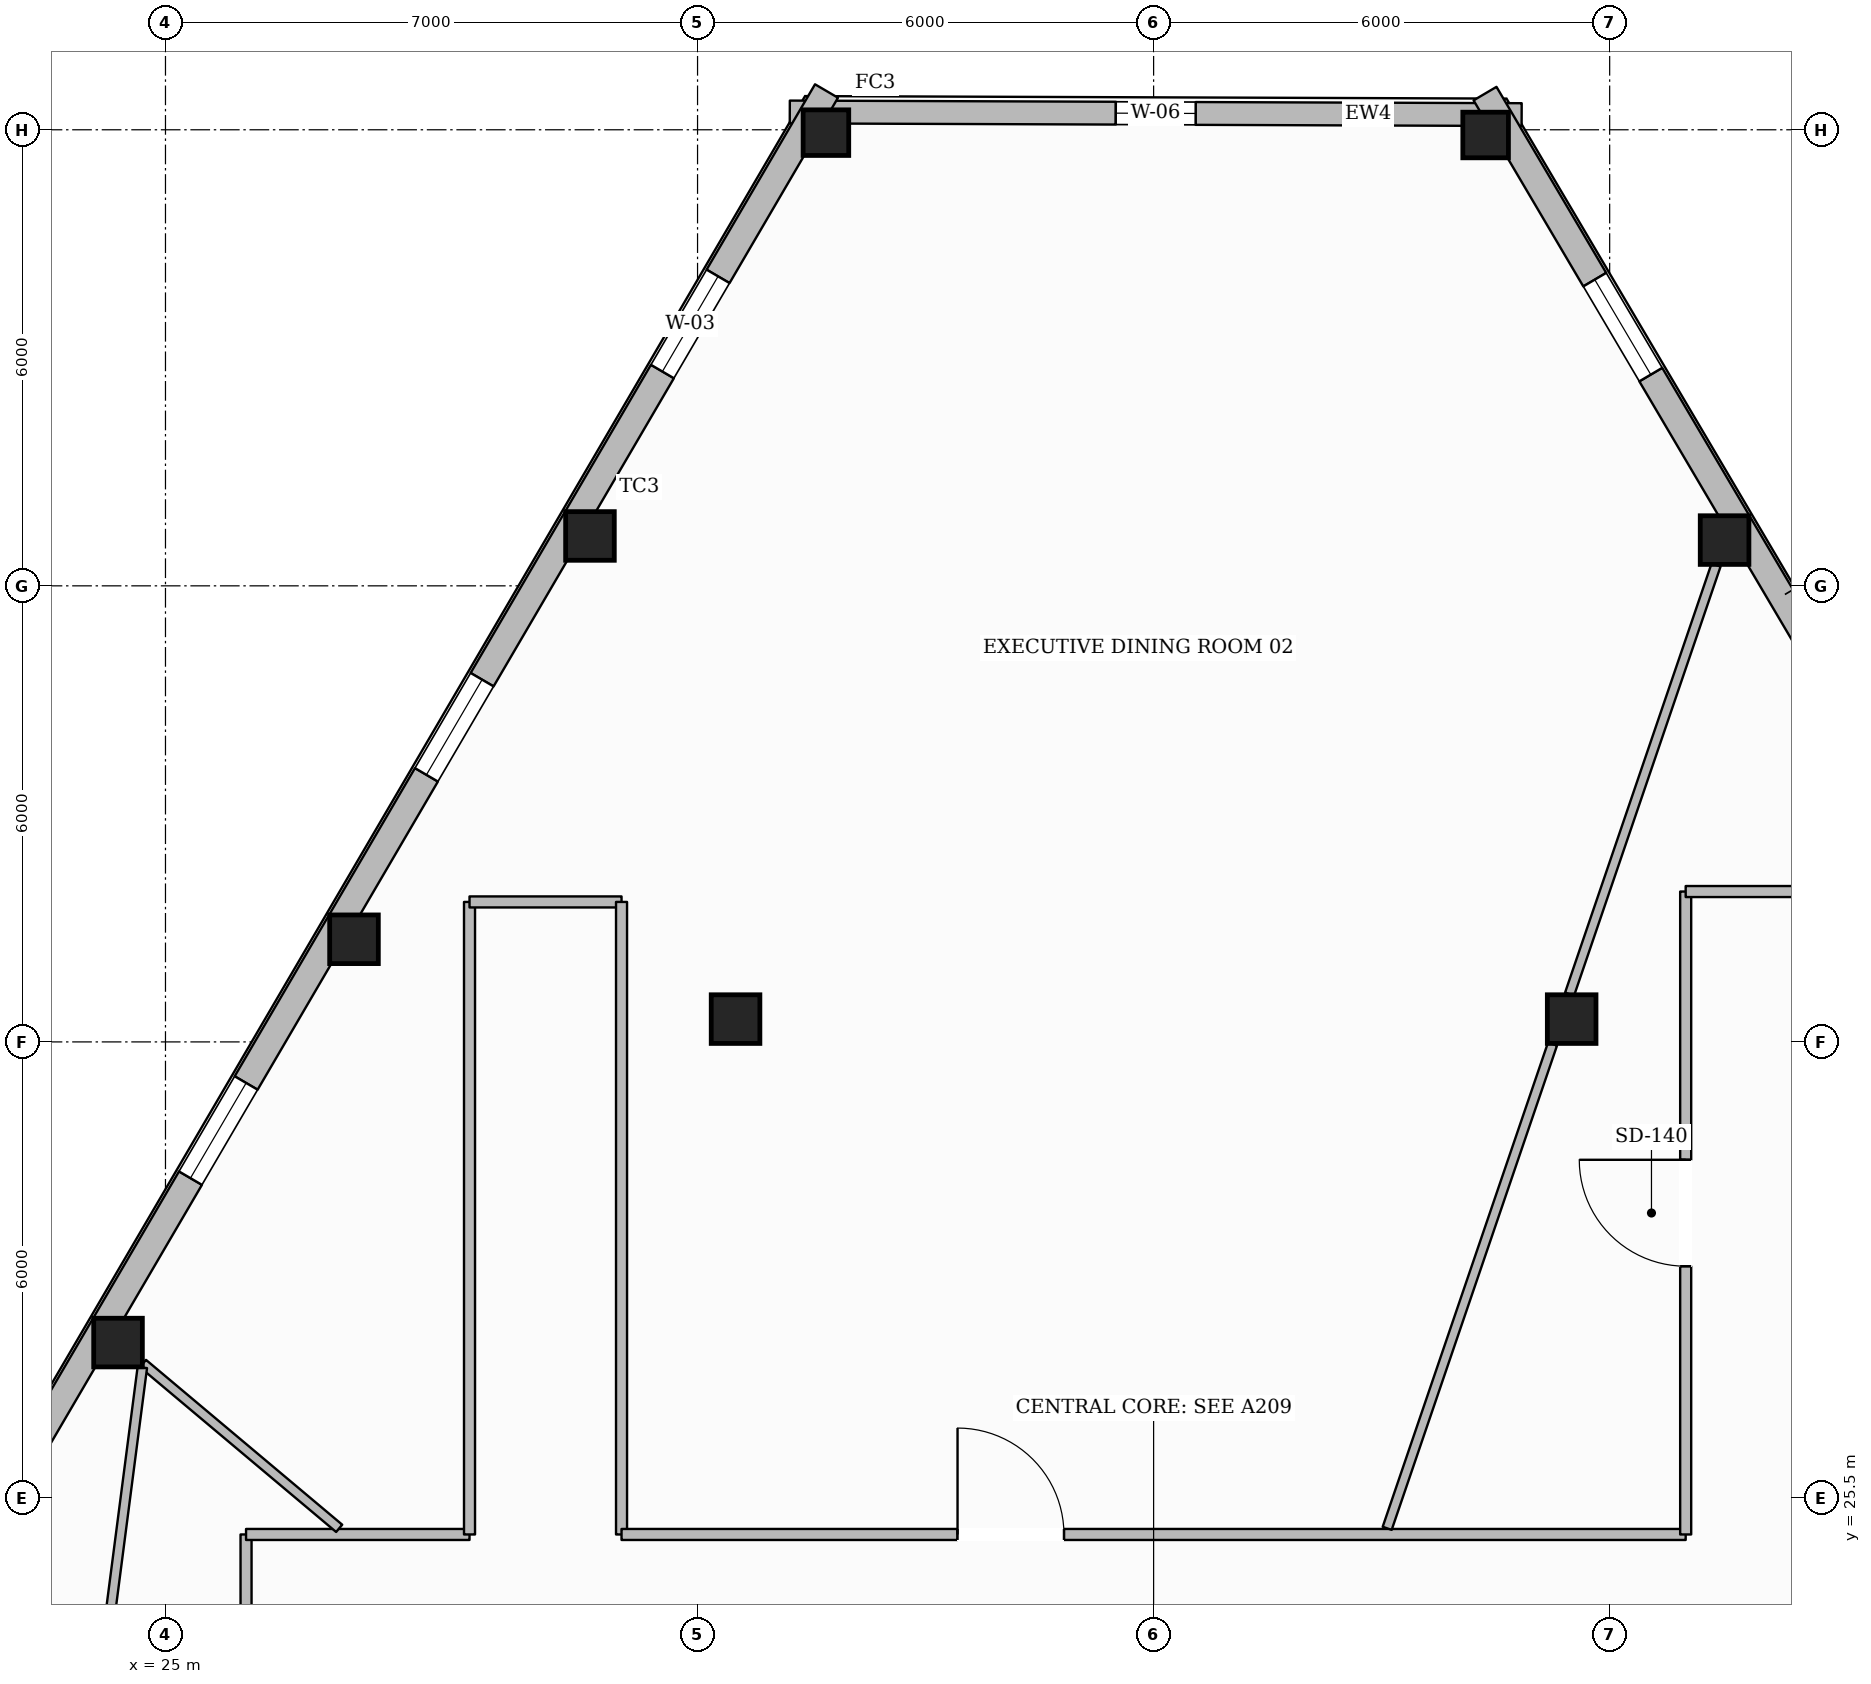
"""IFC4 building model, lengths in metres.
Left out: names, types, materials, properties, quantities, classifications, styles, units other than length and angle.
Written with IfcOpenShell. Run it as: python <this file> out.ifc"""

import sys

from ifc_helpers import new_model, si_unit, direction, frame, frame_2d, origin, origin_2d, place, context, subcontext, project, spatial, rectangle, hollow_rectangle, extrude, element, fill, save


model = new_model("IFC4")
c1 = context("Model", 3, precision=1e-05, world=origin(), true_north=direction((0.0, 1.0)))
c2 = subcontext(c1, "Body", "Model", "MODEL_VIEW")
j1 = project(units=[si_unit("LENGTHUNIT", "METRE"), si_unit("PLANEANGLEUNIT", "RADIAN")], contexts=[c1])
p1 = place(None, origin())
s1 = spatial("IfcSite", under=j1, at=p1, CompositionType="ELEMENT")
p2 = place(p1, origin())
s2 = spatial("IfcBuilding", under=s1, at=p2, CompositionType="ELEMENT")
p3 = place(p2, frame((0.0, 0.0, 199.65)))
s3 = spatial("IfcBuildingStorey", under=s2, at=p3, CompositionType="ELEMENT", Elevation=199.65)
p4 = place(p3, frame((33.689, 43.462, 0.0), z_axis=(0.0, 0.0, 1.0), x_axis=(1.0, 0.0, 0.0)))
e1 = element("IfcColumn", 1, at=p4, inside=s3, PredefinedType="COLUMN", context=c2, shape_type="SweptSolid", body=[
    extrude(hollow_rectangle(XDim=0.6, YDim=0.6, WallThickness=0.028, at=origin_2d()), origin(), (0.0, 0.0, 1.0), 3.6),
])
for number, where, z_axis, x_axis in (
    (2, (30.585, 38.156, 0.0), (0.0, 0.0, 1.0), (1.0, 0.0, 0.0)),
    (3, (27.48, 32.85, 0.0), (0.0, 0.0, 1.0), (1.0, 0.0, 0.0)),
    (4, (24.376, 27.544, 0.0), (0.0, 0.0, 1.0), (1.0, 0.0, 0.0)),
    (5, (45.512, 38.102, 0.0), (0.0, 0.0, 1.0), (1.0, 0.0, 0.0)),
):
    element("IfcColumn", number, at=place(p3, frame(where, z_axis=z_axis, x_axis=x_axis)), inside=s3, PredefinedType="COLUMN", context=c2, shape_type="SweptSolid", body=[
        extrude(hollow_rectangle(XDim=0.64, YDim=0.64, WallThickness=0.028, at=origin_2d()), origin(), (0.0, 0.0, 1.0), 3.6),
    ])
p5 = place(p3, frame((42.368, 43.431, 0.0), z_axis=(0.0, 0.0, 1.0), x_axis=(1.0, 0.0, 0.0)))
e6 = element("IfcColumn", 6, at=p5, inside=s3, PredefinedType="COLUMN", context=c2, shape_type="SweptSolid", body=[
    extrude(hollow_rectangle(XDim=0.6, YDim=0.6, WallThickness=0.028, at=origin_2d()), origin(), (0.0, 0.0, 1.0), 3.6),
])
for number, where, z_axis, x_axis in (
    (7, (32.5, 31.8, 0.0), (0.0, 0.0, 1.0), (1.0, 0.0, 0.0)),
    (8, (43.5, 31.8, 0.0), (0.0, 0.0, 1.0), (1.0, 0.0, 0.0)),
):
    element("IfcColumn", number, at=place(p3, frame(where, z_axis=z_axis, x_axis=x_axis)), inside=s3, PredefinedType="COLUMN", context=c2, shape_type="SweptSolid", body=[
        extrude(hollow_rectangle(XDim=0.64, YDim=0.64, WallThickness=0.028, at=origin_2d()), origin(), (0.0, 0.0, 1.0), 3.6),
    ])
p6 = place(p3, frame((33.214, 43.734, 0.0), z_axis=(0.0, 0.0, 1.0), x_axis=(0.999993608919, -0.00357520916, 0.0)))
e9 = element("IfcWall", 9, at=p6, inside=s3, PredefinedType="STANDARD", context=c2, shape_type="SweptSolid", body=[
    extrude(rectangle(XDim=9.628, YDim=0.3, at=frame_2d((4.814, 0.0))), origin(), (0.0, 0.0, 1.0), 3.132),
])
p7 = place(p6, frame((4.289, 0.0, 0.65)))
e10 = element("IfcOpeningElement", 10, at=p7, cuts=e9, PredefinedType="OPENING", context=c2, shape_type="SweptSolid", body=[
    extrude(rectangle(XDim=1.05, YDim=1.7, at=frame_2d((0.525, 0.85))), frame((0.0, 0.16, 0.0), z_axis=(0.0, -1.0, 0.0), x_axis=(1.0, 0.0, 0.0)), (0.0, 0.0, 1.0), 0.32),
])
p8 = place(p3, frame((14.586, 11.347, 0.0), z_axis=(0.0, 0.0, 1.0), x_axis=(0.504997770855, 0.863120647089, 0.0)))
e11 = element("IfcWall", 11, at=p8, inside=s3, PredefinedType="STANDARD", context=c2, shape_type="SweptSolid", body=[
    extrude(rectangle(XDim=37.843, YDim=0.35, at=frame_2d((18.921, 0.0))), origin(), (0.0, 0.0, 1.0), 3.132),
])
p9 = place(p8, frame((9.061, 0.0, 0.0)))
e12 = element("IfcOpeningElement", 12, at=p9, cuts=e11, PredefinedType="OPENING", context=c2, shape_type="SweptSolid", body=[
    extrude(rectangle(XDim=1.0, YDim=2.2, at=frame_2d((0.5, 1.1))), frame((0.0, 0.185, 0.0), z_axis=(0.0, -1.0, 0.0), x_axis=(1.0, 0.0, 0.0)), (0.0, 0.0, 1.0), 0.37),
])
p10 = place(p8, frame((33.567, 0.0, 0.65)))
e13 = element("IfcOpeningElement", 13, at=p10, cuts=e11, PredefinedType="OPENING", context=c2, shape_type="SweptSolid", body=[
    extrude(rectangle(XDim=1.45, YDim=1.75, at=frame_2d((0.725, 0.875))), frame((0.0, 0.185, 0.0), z_axis=(0.0, -1.0, 0.0), x_axis=(1.0, 0.0, 0.0)), (0.0, 0.0, 1.0), 0.37),
])
p11 = place(p8, frame((27.42, 0.0, 0.65)))
e14 = element("IfcOpeningElement", 14, at=p11, cuts=e11, PredefinedType="OPENING", context=c2, shape_type="SweptSolid", body=[
    extrude(rectangle(XDim=1.45, YDim=1.75, at=frame_2d((0.725, 0.875))), frame((0.0, 0.185, 0.0), z_axis=(0.0, -1.0, 0.0), x_axis=(1.0, 0.0, 0.0)), (0.0, 0.0, 1.0), 0.37),
])
p12 = place(p8, frame((21.273, 0.0, 0.65)))
e15 = element("IfcOpeningElement", 15, at=p12, cuts=e11, PredefinedType="OPENING", context=c2, shape_type="SweptSolid", body=[
    extrude(rectangle(XDim=1.45, YDim=1.75, at=frame_2d((0.725, 0.875))), frame((0.0, 0.185, 0.0), z_axis=(0.0, -1.0, 0.0), x_axis=(1.0, 0.0, 0.0)), (0.0, 0.0, 1.0), 0.37),
])
p13 = place(p8, frame((2.831, 0.0, 0.65)))
e16 = element("IfcOpeningElement", 16, at=p13, cuts=e11, PredefinedType="OPENING", context=c2, shape_type="SweptSolid", body=[
    extrude(rectangle(XDim=1.45, YDim=1.75, at=frame_2d((0.725, 0.875))), frame((0.0, 0.185, 0.0), z_axis=(0.0, -1.0, 0.0), x_axis=(1.0, 0.0, 0.0)), (0.0, 0.0, 1.0), 0.37),
])
p14 = place(p3, frame((42.36, 43.976, 0.0), z_axis=(0.0, 0.0, 1.0), x_axis=(0.508076618563, -0.861311877121, 0.0)))
e17 = element("IfcWall", 17, at=p14, inside=s3, PredefinedType="STANDARD", context=c2, shape_type="SweptSolid", body=[
    extrude(rectangle(XDim=38.079, YDim=0.35, at=frame_2d((19.04, 0.0))), origin(), (0.0, 0.0, 1.0), 3.132),
])
p15 = place(p14, frame((9.12, 0.0, 0.0)))
e18 = element("IfcOpeningElement", 18, at=p15, cuts=e17, PredefinedType="OPENING", context=c2, shape_type="SweptSolid", body=[
    extrude(rectangle(XDim=1.0, YDim=2.2, at=frame_2d((0.5, 1.1))), frame((0.0, 0.185, 0.0), z_axis=(0.0, -1.0, 0.0), x_axis=(1.0, 0.0, 0.0)), (0.0, 0.0, 1.0), 0.37),
])
p16 = place(p14, frame((33.779, 0.0, 0.65)))
e19 = element("IfcOpeningElement", 19, at=p16, cuts=e17, PredefinedType="OPENING", context=c2, shape_type="SweptSolid", body=[
    extrude(rectangle(XDim=1.45, YDim=1.75, at=frame_2d((0.725, 0.875))), frame((0.0, 0.185, 0.0), z_axis=(0.0, -1.0, 0.0), x_axis=(1.0, 0.0, 0.0)), (0.0, 0.0, 1.0), 0.37),
])
p17 = place(p14, frame((27.591, 0.0, 0.65)))
e20 = element("IfcOpeningElement", 20, at=p17, cuts=e17, PredefinedType="OPENING", context=c2, shape_type="SweptSolid", body=[
    extrude(rectangle(XDim=1.45, YDim=1.75, at=frame_2d((0.725, 0.875))), frame((0.0, 0.185, 0.0), z_axis=(0.0, -1.0, 0.0), x_axis=(1.0, 0.0, 0.0)), (0.0, 0.0, 1.0), 0.37),
])
p18 = place(p14, frame((21.404, 0.0, 0.65)))
e21 = element("IfcOpeningElement", 21, at=p18, cuts=e17, PredefinedType="OPENING", context=c2, shape_type="SweptSolid", body=[
    extrude(rectangle(XDim=1.45, YDim=1.75, at=frame_2d((0.725, 0.875))), frame((0.0, 0.185, 0.0), z_axis=(0.0, -1.0, 0.0), x_axis=(1.0, 0.0, 0.0)), (0.0, 0.0, 1.0), 0.37),
])
p19 = place(p14, frame((2.842, 0.0, 0.65)))
e22 = element("IfcOpeningElement", 22, at=p19, cuts=e17, PredefinedType="OPENING", context=c2, shape_type="SweptSolid", body=[
    extrude(rectangle(XDim=1.45, YDim=1.75, at=frame_2d((0.725, 0.875))), frame((0.0, 0.185, 0.0), z_axis=(0.0, -1.0, 0.0), x_axis=(1.0, 0.0, 0.0)), (0.0, 0.0, 1.0), 0.37),
])
p20 = place(p3, frame((26.06, 17.65, 0.0), z_axis=(0.0, 0.0, 1.0), x_axis=(0.0, 1.0, 0.0)))
e23 = element("IfcWall", 23, at=p20, inside=s3, PredefinedType="PARTITIONING", context=c2, shape_type="SweptSolid", body=[
    extrude(rectangle(XDim=7.37, YDim=0.145, at=frame_2d((3.685, 0.0))), origin(), (0.0, 0.0, 1.0), 3.339),
])
p21 = place(p20, frame((3.195, 0.0, 0.0)))
e24 = element("IfcOpeningElement", 24, at=p21, cuts=e23, PredefinedType="OPENING", context=c2, shape_type="SweptSolid", body=[
    extrude(rectangle(XDim=0.98, YDim=2.15, at=frame_2d((0.49, 1.075))), frame((0.0, 0.083, 0.0), z_axis=(0.0, -1.0, 0.0), x_axis=(1.0, 0.0, 0.0)), (0.0, 0.0, 1.0), 0.165),
])
p22 = place(p3, frame((26.06, 25.02, 0.0), z_axis=(0.0, 0.0, 1.0), x_axis=(1.0, 0.0, 0.0)))
e25 = element("IfcWall", 25, at=p22, inside=s3, PredefinedType="PARTITIONING", context=c2, shape_type="SweptSolid", body=[
    extrude(rectangle(XDim=2.94, YDim=0.145, at=frame_2d((1.47, 0.0))), origin(), (0.0, 0.0, 1.0), 3.6),
])
p23 = place(p3, frame((29.0, 25.02, 0.0), z_axis=(0.0, 0.0, 1.0), x_axis=(0.0, 1.0, 0.0)))
e26 = element("IfcWall", 26, at=p23, inside=s3, PredefinedType="PARTITIONING", context=c2, shape_type="SweptSolid", body=[
    extrude(rectangle(XDim=8.322, YDim=0.145, at=frame_2d((4.161, 0.0))), origin(), (0.0, 0.0, 1.0), 3.6),
])
p24 = place(p3, frame((29.0, 33.342, 0.0), z_axis=(0.0, 0.0, 1.0), x_axis=(1.0, 0.0, 0.0)))
e27 = element("IfcWall", 27, at=p24, inside=s3, PredefinedType="PARTITIONING", context=c2, shape_type="SweptSolid", body=[
    extrude(rectangle(XDim=2.0, YDim=0.145, at=frame_2d((1.0, 0.0))), origin(), (0.0, 0.0, 1.0), 3.6),
])
p25 = place(p3, frame((31.0, 33.342, 0.0), z_axis=(0.0, 0.0, 1.0), x_axis=(0.0, -1.0, 0.0)))
e28 = element("IfcWall", 28, at=p25, inside=s3, PredefinedType="PARTITIONING", context=c2, shape_type="SweptSolid", body=[
    extrude(rectangle(XDim=8.322, YDim=0.145, at=frame_2d((4.161, 0.0))), origin(), (0.0, 0.0, 1.0), 3.6),
])
p26 = place(p3, frame((31.0, 25.02, 0.0), z_axis=(0.0, 0.0, 1.0), x_axis=(1.0, 0.0, 0.0)))
e29 = element("IfcWall", 29, at=p26, inside=s3, PredefinedType="PARTITIONING", context=c2, shape_type="SweptSolid", body=[
    extrude(rectangle(XDim=14.0, YDim=0.145, at=frame_2d((7.0, 0.0))), origin(), (0.0, 0.0, 1.0), 3.6),
])
p27 = place(p26, frame((4.42, 0.0, 0.0)))
e30 = element("IfcOpeningElement", 30, at=p27, cuts=e29, PredefinedType="OPENING", context=c2, shape_type="SweptSolid", body=[
    extrude(rectangle(XDim=1.4, YDim=2.2, at=frame_2d((0.7, 1.1))), frame((0.0, 0.083, 0.0), z_axis=(0.0, -1.0, 0.0), x_axis=(1.0, 0.0, 0.0)), (0.0, 0.0, 1.0), 0.165),
])
p28 = place(p3, frame((45.0, 25.02, 0.0), z_axis=(0.0, 0.0, 1.0), x_axis=(0.0, 1.0, 0.0)))
e31 = element("IfcWall", 31, at=p28, inside=s3, PredefinedType="PARTITIONING", context=c2, shape_type="SweptSolid", body=[
    extrude(rectangle(XDim=8.458, YDim=0.145, at=frame_2d((4.229, 0.0))), origin(), (0.0, 0.0, 1.0), 3.6),
])
p29 = place(p28, frame((3.529, 0.0, 0.0)))
e32 = element("IfcOpeningElement", 32, at=p29, cuts=e31, PredefinedType="OPENING", context=c2, shape_type="SweptSolid", body=[
    extrude(rectangle(XDim=1.4, YDim=2.2, at=frame_2d((0.7, 1.1))), frame((0.0, 0.083, 0.0), z_axis=(0.0, -1.0, 0.0), x_axis=(1.0, 0.0, 0.0)), (0.0, 0.0, 1.0), 0.165),
])
p30 = place(p3, frame((45.0, 33.478, 0.0), z_axis=(0.0, 0.0, 1.0), x_axis=(1.0, 0.0, 0.0)))
e33 = element("IfcWall", 33, at=p30, inside=s3, PredefinedType="PARTITIONING", context=c2, shape_type="SweptSolid", body=[
    extrude(rectangle(XDim=2.0, YDim=0.145, at=frame_2d((1.0, 0.0))), origin(), (0.0, 0.0, 1.0), 3.6),
])
p31 = place(p3, frame((41.073, 25.101, 0.0), z_axis=(0.0, 0.0, 1.0), x_axis=(0.323105831647, 0.946362838216, 0.0)))
e34 = element("IfcWall", 34, at=p31, inside=s3, PredefinedType="PARTITIONING", context=c2, shape_type="SweptSolid", body=[
    extrude(rectangle(XDim=6.732, YDim=0.125, at=frame_2d((3.366, 0.0))), origin(), (0.0, 0.0, 1.0), 3.141),
])
p32 = place(p3, frame((43.472, 32.128, 0.0), z_axis=(0.0, 0.0, 1.0), x_axis=(0.323118824799, 0.946358402013, 0.0)))
e35 = element("IfcWall", 35, at=p32, inside=s3, PredefinedType="PARTITIONING", context=c2, shape_type="SweptSolid", body=[
    extrude(rectangle(XDim=5.966, YDim=0.125, at=frame_2d((2.983, 0.0))), origin(), (0.0, 0.0, 1.0), 3.6),
])
p33 = place(p3, frame((27.285, 25.101, 0.0), z_axis=(0.0, 0.0, 1.0), x_axis=(-0.765710570965, 0.643185293296, 0.0)))
e36 = element("IfcWall", 36, at=p33, inside=s3, PredefinedType="PARTITIONING", context=c2, shape_type="SweptSolid", body=[
    extrude(rectangle(XDim=3.371, YDim=0.125, at=frame_2d((1.686, 0.0))), origin(), (0.0, 0.0, 1.0), 3.141),
])
p34 = place(p3, frame((24.695, 27.217, 0.0), z_axis=(0.0, 0.0, 1.0), x_axis=(-0.128889138704, -0.991659008896, 0.0)))
e37 = element("IfcWall", 37, at=p34, inside=s3, PredefinedType="PARTITIONING", context=c2, shape_type="SweptSolid", body=[
    extrude(rectangle(XDim=14.17, YDim=0.125, at=frame_2d((7.085, 0.0))), origin(), (0.0, 0.0, 1.0), 3.339),
])
p35 = place(p34, frame((6.591, 0.0, 0.0)))
e38 = element("IfcOpeningElement", 38, at=p35, cuts=e37, PredefinedType="OPENING", context=c2, shape_type="SweptSolid", body=[
    extrude(rectangle(XDim=0.98, YDim=2.15, at=frame_2d((0.49, 1.075))), frame((0.0, 0.073, 0.0), z_axis=(0.0, -1.0, 0.0), x_axis=(1.0, 0.0, 0.0)), (0.0, 0.0, 1.0), 0.145),
])
p36 = place(p10, origin())
e39 = element("IfcWindow", 39, at=p36, inside=s3, PartitioningType="SINGLE_PANEL", PredefinedType="WINDOW", context=c2, shape_type="SweptSolid", body=[
    extrude(rectangle(XDim=1.45, YDim=1.75, at=frame_2d((0.725, 0.875))), frame((0.0, 0.03, 0.0), z_axis=(0.0, -1.0, 0.0), x_axis=(1.0, 0.0, 0.0)), (0.0, 0.0, 1.0), 0.06),
])
fill(e13, e39)
p37 = place(p11, origin())
e40 = element("IfcWindow", 40, at=p37, inside=s3, PartitioningType="SINGLE_PANEL", PredefinedType="WINDOW", context=c2, shape_type="SweptSolid", body=[
    extrude(rectangle(XDim=1.45, YDim=1.75, at=frame_2d((0.725, 0.875))), frame((0.0, 0.03, 0.0), z_axis=(0.0, -1.0, 0.0), x_axis=(1.0, 0.0, 0.0)), (0.0, 0.0, 1.0), 0.06),
])
fill(e14, e40)
p38 = place(p12, origin())
e41 = element("IfcWindow", 41, at=p38, inside=s3, PartitioningType="SINGLE_PANEL", PredefinedType="WINDOW", context=c2, shape_type="SweptSolid", body=[
    extrude(rectangle(XDim=1.45, YDim=1.75, at=frame_2d((0.725, 0.875))), frame((0.0, 0.03, 0.0), z_axis=(0.0, -1.0, 0.0), x_axis=(1.0, 0.0, 0.0)), (0.0, 0.0, 1.0), 0.06),
])
fill(e15, e41)
p39 = place(p19, origin())
e42 = element("IfcWindow", 42, at=p39, inside=s3, PartitioningType="SINGLE_PANEL", PredefinedType="WINDOW", context=c2, shape_type="SweptSolid", body=[
    extrude(rectangle(XDim=1.45, YDim=1.75, at=frame_2d((0.725, 0.875))), frame((0.0, 0.03, 0.0), z_axis=(0.0, -1.0, 0.0), x_axis=(1.0, 0.0, 0.0)), (0.0, 0.0, 1.0), 0.06),
])
fill(e22, e42)
p40 = place(p7, origin())
e43 = element("IfcWindow", 43, at=p40, inside=s3, PartitioningType="SINGLE_PANEL", PredefinedType="WINDOW", context=c2, shape_type="SweptSolid", body=[
    extrude(rectangle(XDim=1.05, YDim=1.7, at=frame_2d((0.525, 0.85))), frame((0.0, 0.03, 0.0), z_axis=(0.0, -1.0, 0.0), x_axis=(1.0, 0.0, 0.0)), (0.0, 0.0, 1.0), 0.06),
])
fill(e10, e43)
p41 = place(p29, origin())
e44 = element("IfcDoor", 44, at=p41, inside=s3, OperationType="SINGLE_SWING_RIGHT", PredefinedType="DOOR", context=c2, shape_type="SweptSolid", body=[
    extrude(rectangle(XDim=1.4, YDim=2.2, at=frame_2d((0.7, 1.1))), frame((0.0, 0.025, 0.0), z_axis=(0.0, -1.0, 0.0), x_axis=(1.0, 0.0, 0.0)), (0.0, 0.0, 1.0), 0.05),
])
fill(e32, e44)
p42 = place(p27, origin())
e45 = element("IfcDoor", 45, at=p42, inside=s3, OperationType="SINGLE_SWING_LEFT", PredefinedType="DOOR", context=c2, shape_type="SweptSolid", body=[
    extrude(rectangle(XDim=1.4, YDim=2.2, at=frame_2d((0.7, 1.1))), frame((0.0, 0.025, 0.0), z_axis=(0.0, -1.0, 0.0), x_axis=(1.0, 0.0, 0.0)), (0.0, 0.0, 1.0), 0.05),
])
fill(e30, e45)
save(model, sys.argv[1])
